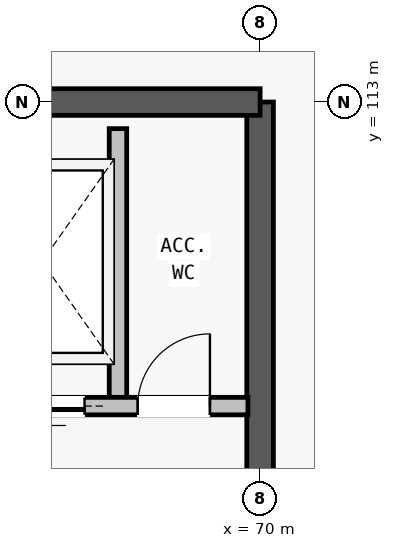
"""IFC4 building model, lengths in metres.
Left out: names, types, materials, properties, quantities, classifications, styles, units other than length and angle.
Written with IfcOpenShell. Run it as: python <this file> out.ifc"""

import sys

from ifc_helpers import new_model, si_unit, direction, frame, frame_2d, origin, place, context, subcontext, project, spatial, rectangle, extrude, element, fill, save


model = new_model("IFC4")
c1 = context("Model", 3, precision=1e-05, world=origin(), true_north=direction((0.0, 1.0)))
c2 = subcontext(c1, "Body", "Model", "MODEL_VIEW")
j1 = project(units=[si_unit("LENGTHUNIT", "METRE"), si_unit("PLANEANGLEUNIT", "RADIAN")], contexts=[c1])
p1 = place(None, origin())
s1 = spatial("IfcSite", under=j1, at=p1, CompositionType="ELEMENT")
p2 = place(p1, origin())
s2 = spatial("IfcBuilding", under=s1, at=p2, CompositionType="ELEMENT")
p3 = place(p2, frame((0.0, 0.0, 5.6)))
s3 = spatial("IfcBuildingStorey", under=s2, at=p3, CompositionType="ELEMENT", Elevation=5.6)
p4 = place(p3, frame((70.0, 104.0, 0.0), z_axis=(0.0, 0.0, 1.0), x_axis=(0.0, 1.0, 0.0)))
e1 = element("IfcWall", 1, at=p4, inside=s3, PredefinedType="SHEAR", context=c2, shape_type="SweptSolid", body=[
    extrude(rectangle(XDim=9.0, YDim=0.35, at=frame_2d((4.5, 0.0))), origin(), (0.0, 0.0, 1.0), 3.62),
])
p5 = place(p4, frame((1.4, 0.0, 0.0)))
e2 = element("IfcOpeningElement", 2, at=p5, cuts=e1, PredefinedType="OPENING", context=c2, shape_type="SweptSolid", body=[
    extrude(rectangle(XDim=1.9, YDim=2.3, at=frame_2d((0.95, 1.15))), frame((0.0, 0.185, 0.0), z_axis=(0.0, -1.0, 0.0), x_axis=(1.0, 0.0, 0.0)), (0.0, 0.0, 1.0), 0.37),
])
p6 = place(p3, frame((70.0, 113.0, 0.0), z_axis=(0.0, 0.0, 1.0), x_axis=(-1.0, 0.0, 0.0)))
e3 = element("IfcWall", 3, at=p6, inside=s3, PredefinedType="SHEAR", context=c2, shape_type="SweptSolid", body=[
    extrude(rectangle(XDim=8.0, YDim=0.35, at=frame_2d((4.0, 0.0))), origin(), (0.0, 0.0, 1.0), 3.62),
])
p7 = place(p3, frame((68.13, 109.0, 0.0), z_axis=(0.0, 0.0, 1.0), x_axis=(0.0, 1.0, 0.0)))
e4 = element("IfcWall", 4, at=p7, inside=s3, PredefinedType="PARTITIONING", context=c2, shape_type="SweptSolid", body=[
    extrude(rectangle(XDim=3.65, YDim=0.23, at=frame_2d((1.825, 0.0))), origin(), (0.0, 0.0, 1.0), 2.48),
])
p8 = place(p3, frame((66.21, 109.0, 0.0), z_axis=(0.0, 0.0, 1.0), x_axis=(1.0, 0.0, 0.0)))
e5 = element("IfcWall", 5, at=p8, inside=s3, PredefinedType="PARTITIONING", context=c2, shape_type="SweptSolid", body=[
    extrude(rectangle(XDim=3.63, YDim=0.23, at=frame_2d((1.815, 0.0))), origin(), (0.0, 0.0, 1.0), 2.48),
])
p9 = place(p8, frame((0.38, 0.0, 0.0)))
e6 = element("IfcOpeningElement", 6, at=p9, cuts=e5, PredefinedType="OPENING", context=c2, shape_type="SweptSolid", body=[
    extrude(rectangle(XDim=1.1, YDim=2.15, at=frame_2d((0.55, 1.075))), frame((0.0, 0.125, 0.0), z_axis=(0.0, -1.0, 0.0), x_axis=(1.0, 0.0, 0.0)), (0.0, 0.0, 1.0), 0.25),
])
p10 = place(p8, frame((2.18, 0.0, 0.0)))
e7 = element("IfcOpeningElement", 7, at=p10, cuts=e5, PredefinedType="OPENING", context=c2, shape_type="SweptSolid", body=[
    extrude(rectangle(XDim=0.95, YDim=2.1, at=frame_2d((0.475, 1.05))), frame((0.0, 0.125, 0.0), z_axis=(0.0, -1.0, 0.0), x_axis=(1.0, 0.0, 0.0)), (0.0, 0.0, 1.0), 0.25),
])
p11 = place(p9, origin())
e8 = element("IfcDoor", 8, at=p11, inside=s3, OperationType="SLIDING_TO_LEFT", PredefinedType="DOOR", context=c2, shape_type="SweptSolid", body=[
    extrude(rectangle(XDim=1.1, YDim=2.15, at=frame_2d((0.55, 1.075))), frame((0.0, 0.025, 0.0), z_axis=(0.0, -1.0, 0.0), x_axis=(1.0, 0.0, 0.0)), (0.0, 0.0, 1.0), 0.05),
])
fill(e6, e8)
p12 = place(p10, origin())
e9 = element("IfcDoor", 9, at=p12, inside=s3, OperationType="SINGLE_SWING_RIGHT", PredefinedType="DOOR", context=c2, shape_type="SweptSolid", body=[
    extrude(rectangle(XDim=0.95, YDim=2.1, at=frame_2d((0.475, 1.05))), frame((0.0, 0.025, 0.0), z_axis=(0.0, -1.0, 0.0), x_axis=(1.0, 0.0, 0.0)), (0.0, 0.0, 1.0), 0.05),
])
fill(e7, e9)
save(model, sys.argv[1])
